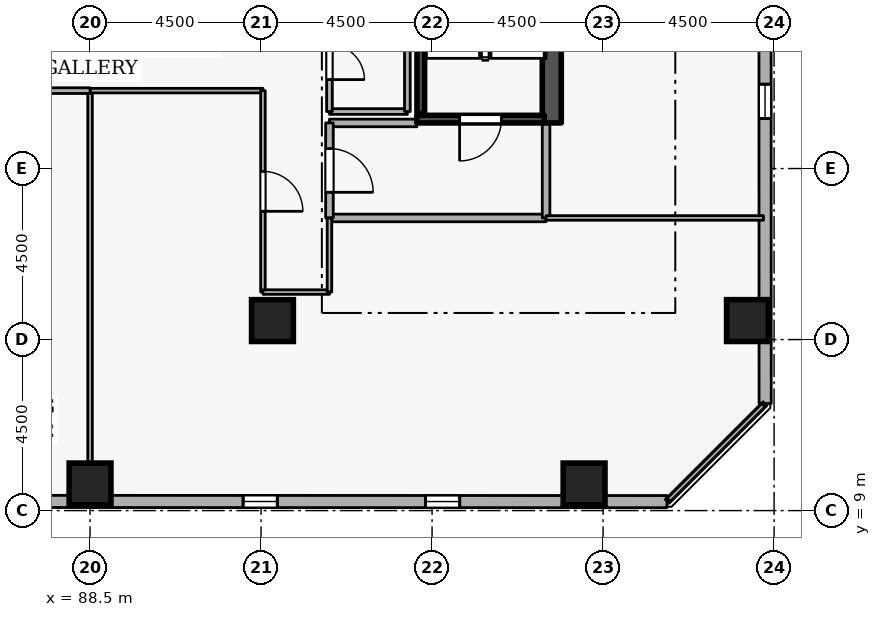
"""IFC4 building model, lengths in metres.
Left out: names, types, materials, properties, quantities, classifications, styles, units other than length and angle.
Written with IfcOpenShell. Run it as: python <this file> out.ifc"""

import sys

from ifc_helpers import new_model, si_unit, direction, frame, frame_2d, origin, origin_2d, place, context, subcontext, project, spatial, rectangle, extrude, element, fill, save


model = new_model("IFC4")
c1 = context("Model", 3, precision=1e-05, world=origin(), true_north=direction((0.0, 1.0)))
c2 = subcontext(c1, "Body", "Model", "MODEL_VIEW")
j1 = project(units=[si_unit("LENGTHUNIT", "METRE"), si_unit("PLANEANGLEUNIT", "RADIAN")], contexts=[c1])
p1 = place(None, origin())
s1 = spatial("IfcSite", under=j1, at=p1, CompositionType="ELEMENT")
p2 = place(p1, origin())
s2 = spatial("IfcBuilding", under=s1, at=p2, CompositionType="ELEMENT")
p3 = place(p2, frame((0.0, 0.0, 178.5)))
s3 = spatial("IfcBuildingStorey", under=s2, at=p3, CompositionType="ELEMENT", Elevation=178.5)
p4 = place(p3, frame((100.65, 19.2, 0.0), z_axis=(0.0, 0.0, 1.0), x_axis=(0.0, 1.0, 0.0)))
e1 = element("IfcWall", 1, at=p4, inside=s3, PredefinedType="SHEAR", context=c2, shape_type="SweptSolid", body=[
    extrude(rectangle(XDim=15.6, YDim=0.5, at=frame_2d((7.8, 0.0))), origin(), (0.0, 0.0, 1.0), 3.6),
])
for number, where, z_axis, x_axis in (
    (2, (105.8, 14.0, 0.0), (0.0, 0.0, 1.0), (1.0, 0.0, 0.0)),
    (3, (101.5, 9.7, 0.0), (0.0, 0.0, 1.0), (1.0, 0.0, 0.0)),
    (4, (88.5, 9.7, 0.0), (0.0, 0.0, 1.0), (1.0, 0.0, 0.0)),
    (5, (93.3, 14.0, 0.0), (0.0, 0.0, 1.0), (1.0, 0.0, 0.0)),
):
    element("IfcColumn", number, at=place(p3, frame(where, z_axis=z_axis, x_axis=x_axis)), inside=s3, PredefinedType="COLUMN", context=c2, shape_type="SweptSolid", body=[
        extrude(rectangle(XDim=1.1, YDim=1.1, at=origin_2d()), origin(), (0.0, 0.0, 1.0), 3.6),
    ])
p5 = place(p3, frame((70.628, 9.246, 0.0), z_axis=(0.0, 0.0, 1.0), x_axis=(0.999999944762, -0.000332378036, 0.0)))
e6 = element("IfcWall", 6, at=p5, inside=s3, PredefinedType="STANDARD", context=c2, shape_type="SweptSolid", body=[
    extrude(rectangle(XDim=33.054, YDim=0.32, at=frame_2d((16.527, 0.0))), origin(), (0.0, 0.0, 1.0), 2.7),
])
p6 = place(p5, frame((2.7, 0.0, 0.72)))
e7 = element("IfcOpeningElement", 7, at=p6, cuts=e6, PredefinedType="OPENING", context=c2, shape_type="SweptSolid", body=[
    extrude(rectangle(XDim=0.9, YDim=1.75, at=frame_2d((0.45, 0.875))), frame((0.0, 0.17, 0.0), z_axis=(0.0, -1.0, 0.0), x_axis=(1.0, 0.0, 0.0)), (0.0, 0.0, 1.0), 0.34),
])
p7 = place(p5, frame((7.5, 0.0, 0.72)))
e8 = element("IfcOpeningElement", 8, at=p7, cuts=e6, PredefinedType="OPENING", context=c2, shape_type="SweptSolid", body=[
    extrude(rectangle(XDim=0.9, YDim=1.75, at=frame_2d((0.45, 0.875))), frame((0.0, 0.17, 0.0), z_axis=(0.0, -1.0, 0.0), x_axis=(1.0, 0.0, 0.0)), (0.0, 0.0, 1.0), 0.34),
])
p8 = place(p5, frame((12.3, 0.0, 0.72)))
e9 = element("IfcOpeningElement", 9, at=p8, cuts=e6, PredefinedType="OPENING", context=c2, shape_type="SweptSolid", body=[
    extrude(rectangle(XDim=0.9, YDim=1.75, at=frame_2d((0.45, 0.875))), frame((0.0, 0.17, 0.0), z_axis=(0.0, -1.0, 0.0), x_axis=(1.0, 0.0, 0.0)), (0.0, 0.0, 1.0), 0.34),
])
p9 = place(p5, frame((21.9, 0.0, 0.72)))
e10 = element("IfcOpeningElement", 10, at=p9, cuts=e6, PredefinedType="OPENING", context=c2, shape_type="SweptSolid", body=[
    extrude(rectangle(XDim=0.9, YDim=1.75, at=frame_2d((0.45, 0.875))), frame((0.0, 0.17, 0.0), z_axis=(0.0, -1.0, 0.0), x_axis=(1.0, 0.0, 0.0)), (0.0, 0.0, 1.0), 0.34),
])
p10 = place(p5, frame((26.7, 0.0, 0.72)))
e11 = element("IfcOpeningElement", 11, at=p10, cuts=e6, PredefinedType="OPENING", context=c2, shape_type="SweptSolid", body=[
    extrude(rectangle(XDim=0.9, YDim=1.75, at=frame_2d((0.45, 0.875))), frame((0.0, 0.17, 0.0), z_axis=(0.0, -1.0, 0.0), x_axis=(1.0, 0.0, 0.0)), (0.0, 0.0, 1.0), 0.34),
])
p11 = place(p3, frame((106.265, 11.819, 0.0), z_axis=(0.0, 0.0, 1.0), x_axis=(-0.000332378036, 0.999999944762, 0.0)))
e12 = element("IfcWall", 12, at=p11, inside=s3, PredefinedType="STANDARD", context=c2, shape_type="SweptSolid", body=[
    extrude(rectangle(XDim=33.054, YDim=0.32, at=frame_2d((16.527, 0.0))), origin(), (0.0, 0.0, 1.0), 2.7),
])
p12 = place(p11, frame((7.5, 0.0, 0.72)))
e13 = element("IfcOpeningElement", 13, at=p12, cuts=e12, PredefinedType="OPENING", context=c2, shape_type="SweptSolid", body=[
    extrude(rectangle(XDim=0.9, YDim=1.75, at=frame_2d((0.45, 0.875))), frame((0.0, 0.17, 0.0), z_axis=(0.0, -1.0, 0.0), x_axis=(1.0, 0.0, 0.0)), (0.0, 0.0, 1.0), 0.34),
])
p13 = place(p11, frame((12.3, 0.0, 0.72)))
e14 = element("IfcOpeningElement", 14, at=p13, cuts=e12, PredefinedType="OPENING", context=c2, shape_type="SweptSolid", body=[
    extrude(rectangle(XDim=0.9, YDim=1.75, at=frame_2d((0.45, 0.875))), frame((0.0, 0.17, 0.0), z_axis=(0.0, -1.0, 0.0), x_axis=(1.0, 0.0, 0.0)), (0.0, 0.0, 1.0), 0.34),
])
p14 = place(p11, frame((17.1, 0.0, 0.72)))
e15 = element("IfcOpeningElement", 15, at=p14, cuts=e12, PredefinedType="OPENING", context=c2, shape_type="SweptSolid", body=[
    extrude(rectangle(XDim=0.9, YDim=1.75, at=frame_2d((0.45, 0.875))), frame((0.0, 0.17, 0.0), z_axis=(0.0, -1.0, 0.0), x_axis=(1.0, 0.0, 0.0)), (0.0, 0.0, 1.0), 0.34),
])
p15 = place(p11, frame((21.9, 0.0, 0.72)))
e16 = element("IfcOpeningElement", 16, at=p15, cuts=e12, PredefinedType="OPENING", context=c2, shape_type="SweptSolid", body=[
    extrude(rectangle(XDim=0.9, YDim=1.75, at=frame_2d((0.45, 0.875))), frame((0.0, 0.17, 0.0), z_axis=(0.0, -1.0, 0.0), x_axis=(1.0, 0.0, 0.0)), (0.0, 0.0, 1.0), 0.34),
])
p16 = place(p3, frame((100.45, 19.3, 0.0), z_axis=(0.0, 0.0, 1.0), x_axis=(-1.0, 0.0, 0.0)))
e17 = element("IfcWall", 17, at=p16, inside=s3, PredefinedType="SHEAR", context=c2, shape_type="SweptSolid", body=[
    extrude(rectangle(XDim=3.35, YDim=0.2, at=frame_2d((1.675, 0.0))), origin(), (0.0, 0.0, 1.0), 3.6),
])
p17 = place(p16, frame((1.125, 0.0, 0.0)))
e18 = element("IfcOpeningElement", 18, at=p17, cuts=e17, PredefinedType="OPENING", context=c2, shape_type="SweptSolid", body=[
    extrude(rectangle(XDim=1.1, YDim=2.1, at=frame_2d((0.55, 1.05))), frame((0.0, 0.11, 0.0), z_axis=(0.0, -1.0, 0.0), x_axis=(1.0, 0.0, 0.0)), (0.0, 0.0, 1.0), 0.22),
])
p18 = place(p3, frame((97.203, 26.55, 0.0), z_axis=(0.0, 0.0, 1.0), x_axis=(0.0, -1.0, 0.0)))
e19 = element("IfcWall", 19, at=p18, inside=s3, PredefinedType="SHEAR", context=c2, shape_type="SweptSolid", body=[
    extrude(rectangle(XDim=7.1, YDim=0.2, at=frame_2d((3.55, 0.0))), origin(), (0.0, 0.0, 1.0), 3.6),
])
p19 = place(p3, frame((94.8, 16.7, 0.0), z_axis=(0.0, 0.0, 1.0), x_axis=(1.0, 0.0, 0.0)))
e20 = element("IfcWall", 20, at=p19, inside=s3, PredefinedType="STANDARD", context=c2, shape_type="SweptSolid", body=[
    extrude(rectangle(XDim=5.7, YDim=0.2, at=frame_2d((2.85, 0.0))), origin(), (0.0, 0.0, 1.0), 3.34),
])
p20 = place(p3, frame((100.5, 16.7, 0.0), z_axis=(0.0, 0.0, 1.0), x_axis=(0.0, 1.0, 0.0)))
e21 = element("IfcWall", 21, at=p20, inside=s3, PredefinedType="STANDARD", context=c2, shape_type="SweptSolid", body=[
    extrude(rectangle(XDim=2.5, YDim=0.2, at=frame_2d((1.25, 0.0))), origin(), (0.0, 0.0, 1.0), 3.34),
])
p21 = place(p3, frame((97.1, 19.2, 0.0), z_axis=(0.0, 0.0, 1.0), x_axis=(-1.0, 0.0, 0.0)))
e22 = element("IfcWall", 22, at=p21, inside=s3, PredefinedType="STANDARD", context=c2, shape_type="SweptSolid", body=[
    extrude(rectangle(XDim=2.3, YDim=0.2, at=frame_2d((1.15, 0.0))), origin(), (0.0, 0.0, 1.0), 2.545),
])
p22 = place(p3, frame((94.8, 19.2, 0.0), z_axis=(0.0, 0.0, 1.0), x_axis=(0.0, -1.0, 0.0)))
e23 = element("IfcWall", 23, at=p22, inside=s3, PredefinedType="STANDARD", context=c2, shape_type="SweptSolid", body=[
    extrude(rectangle(XDim=2.5, YDim=0.2, at=frame_2d((1.25, 0.0))), origin(), (0.0, 0.0, 1.0), 3.34),
])
p23 = place(p22, frame((0.675, 0.0, 0.0)))
e24 = element("IfcOpeningElement", 24, at=p23, cuts=e23, PredefinedType="OPENING", context=c2, shape_type="SweptSolid", body=[
    extrude(rectangle(XDim=1.15, YDim=2.1, at=frame_2d((0.575, 1.05))), frame((0.0, 0.11, 0.0), z_axis=(0.0, -1.0, 0.0), x_axis=(1.0, 0.0, 0.0)), (0.0, 0.0, 1.0), 0.22),
])
p24 = place(p3, frame((94.8, 19.5, 0.0), z_axis=(0.0, 0.0, 1.0), x_axis=(1.0, 0.0, 0.0)))
e25 = element("IfcWall", 25, at=p24, inside=s3, PredefinedType="PARTITIONING", context=c2, shape_type="SweptSolid", body=[
    extrude(rectangle(XDim=2.05, YDim=0.15, at=frame_2d((1.025, 0.0))), origin(), (0.0, 0.0, 1.0), 2.545),
])
p25 = place(p3, frame((96.85, 19.5, 0.0), z_axis=(0.0, 0.0, 1.0), x_axis=(0.0, 1.0, 0.0)))
e26 = element("IfcWall", 26, at=p25, inside=s3, PredefinedType="PARTITIONING", context=c2, shape_type="SweptSolid", body=[
    extrude(rectangle(XDim=2.6, YDim=0.15, at=frame_2d((1.3, 0.0))), origin(), (0.0, 0.0, 1.0), 3.34),
])
p26 = place(p3, frame((94.8, 22.1, 0.0), z_axis=(0.0, 0.0, 1.0), x_axis=(0.0, -1.0, 0.0)))
e27 = element("IfcWall", 27, at=p26, inside=s3, PredefinedType="PARTITIONING", context=c2, shape_type="SweptSolid", body=[
    extrude(rectangle(XDim=2.6, YDim=0.15, at=frame_2d((1.3, 0.0))), origin(), (0.0, 0.0, 1.0), 3.34),
])
p27 = place(p26, frame((0.84, 0.0, 0.0)))
e28 = element("IfcOpeningElement", 28, at=p27, cuts=e27, PredefinedType="OPENING", context=c2, shape_type="SweptSolid", body=[
    extrude(rectangle(XDim=0.92, YDim=2.08, at=frame_2d((0.46, 1.04))), frame((0.0, 0.085, 0.0), z_axis=(0.0, -1.0, 0.0), x_axis=(1.0, 0.0, 0.0)), (0.0, 0.0, 1.0), 0.17),
])
p28 = place(p3, frame((88.5, 9.28, 0.0), z_axis=(0.0, 0.0, 1.0), x_axis=(0.0, 1.0, 0.0)))
e29 = element("IfcWall", 29, at=p28, inside=s3, PredefinedType="PARTITIONING", context=c2, shape_type="SweptSolid", body=[
    extrude(rectangle(XDim=10.77, YDim=0.12, at=frame_2d((5.385, 0.0))), origin(), (0.0, 0.0, 1.0), 2.932),
])
p29 = place(p3, frame((88.5, 20.05, 0.0), z_axis=(0.0, 0.0, 1.0), x_axis=(1.0, 0.0, 0.0)))
e30 = element("IfcWall", 30, at=p29, inside=s3, PredefinedType="PARTITIONING", context=c2, shape_type="SweptSolid", body=[
    extrude(rectangle(XDim=4.55, YDim=0.12, at=frame_2d((2.275, 0.0))), origin(), (0.0, 0.0, 1.0), 3.34),
])
p30 = place(p3, frame((93.05, 20.05, 0.0), z_axis=(0.0, 0.0, 1.0), x_axis=(0.0, -1.0, 0.0)))
e31 = element("IfcWall", 31, at=p30, inside=s3, PredefinedType="PARTITIONING", context=c2, shape_type="SweptSolid", body=[
    extrude(rectangle(XDim=5.3, YDim=0.12, at=frame_2d((2.65, 0.0))), origin(), (0.0, 0.0, 1.0), 3.34),
])
p31 = place(p30, frame((2.125, 0.0, 0.0)))
e32 = element("IfcOpeningElement", 32, at=p31, cuts=e31, PredefinedType="OPENING", context=c2, shape_type="SweptSolid", body=[
    extrude(rectangle(XDim=1.05, YDim=2.1, at=frame_2d((0.525, 1.05))), frame((0.0, 0.07, 0.0), z_axis=(0.0, -1.0, 0.0), x_axis=(1.0, 0.0, 0.0)), (0.0, 0.0, 1.0), 0.14),
])
p32 = place(p3, frame((93.05, 14.75, 0.0), z_axis=(0.0, 0.0, 1.0), x_axis=(1.0, 0.0, 0.0)))
e33 = element("IfcWall", 33, at=p32, inside=s3, PredefinedType="PARTITIONING", context=c2, shape_type="SweptSolid", body=[
    extrude(rectangle(XDim=1.75, YDim=0.12, at=frame_2d((0.875, 0.0))), origin(), (0.0, 0.0, 1.0), 3.34),
])
p33 = place(p3, frame((94.8, 14.75, 0.0), z_axis=(0.0, 0.0, 1.0), x_axis=(0.0, 1.0, 0.0)))
e34 = element("IfcWall", 34, at=p33, inside=s3, PredefinedType="PARTITIONING", context=c2, shape_type="SweptSolid", body=[
    extrude(rectangle(XDim=1.95, YDim=0.12, at=frame_2d((0.975, 0.0))), origin(), (0.0, 0.0, 1.0), 3.34),
])
p34 = place(p3, frame((100.5, 16.7, 0.0), z_axis=(0.0, 0.0, 1.0), x_axis=(1.0, 0.0, 0.0)))
e35 = element("IfcWall", 35, at=p34, inside=s3, PredefinedType="PARTITIONING", context=c2, shape_type="SweptSolid", body=[
    extrude(rectangle(XDim=5.72, YDim=0.12, at=frame_2d((2.86, 0.0))), origin(), (0.0, 0.0, 1.0), 3.34),
])
p35 = place(p3, frame((106.22, 11.775, 0.0), z_axis=(0.0, 0.0, 1.0), x_axis=(-0.707106781187, -0.707106781187, 0.0)))
e36 = element("IfcWall", 36, at=p35, inside=s3, PredefinedType="PARTITIONING", context=c2, shape_type="SweptSolid", body=[
    extrude(rectangle(XDim=3.528, YDim=0.12, at=frame_2d((1.764, 0.0))), origin(), (0.0, 0.0, 1.0), 3.34),
])
p36 = place(p3, frame((83.95, 20.05, 0.0), z_axis=(0.0, 0.0, 1.0), x_axis=(1.0, 0.0, 0.0)))
e37 = element("IfcWall", 37, at=p36, inside=s3, PredefinedType="PARTITIONING", context=c2, shape_type="SweptSolid", body=[
    extrude(rectangle(XDim=4.55, YDim=0.15, at=frame_2d((2.275, 0.0))), origin(), (0.0, 0.0, 1.0), 3.34),
])
p37 = place(p9, origin())
e38 = element("IfcWindow", 38, at=p37, inside=s3, PartitioningType="SINGLE_PANEL", PredefinedType="WINDOW", context=c2, shape_type="SweptSolid", body=[
    extrude(rectangle(XDim=0.9, YDim=1.75, at=frame_2d((0.45, 0.875))), frame((0.0, 0.03, 0.0), z_axis=(0.0, -1.0, 0.0), x_axis=(1.0, 0.0, 0.0)), (0.0, 0.0, 1.0), 0.06),
])
fill(e10, e38)
p38 = place(p10, origin())
e39 = element("IfcWindow", 39, at=p38, inside=s3, PartitioningType="SINGLE_PANEL", PredefinedType="WINDOW", context=c2, shape_type="SweptSolid", body=[
    extrude(rectangle(XDim=0.9, YDim=1.75, at=frame_2d((0.45, 0.875))), frame((0.0, 0.03, 0.0), z_axis=(0.0, -1.0, 0.0), x_axis=(1.0, 0.0, 0.0)), (0.0, 0.0, 1.0), 0.06),
])
fill(e11, e39)
p39 = place(p12, origin())
e40 = element("IfcWindow", 40, at=p39, inside=s3, PartitioningType="SINGLE_PANEL", PredefinedType="WINDOW", context=c2, shape_type="SweptSolid", body=[
    extrude(rectangle(XDim=0.9, YDim=1.75, at=frame_2d((0.45, 0.875))), frame((0.0, 0.03, 0.0), z_axis=(0.0, -1.0, 0.0), x_axis=(1.0, 0.0, 0.0)), (0.0, 0.0, 1.0), 0.06),
])
fill(e13, e40)
p40 = place(p17, origin())
e41 = element("IfcDoor", 41, at=p40, inside=s3, OperationType="SINGLE_SWING_RIGHT", PredefinedType="DOOR", context=c2, shape_type="SweptSolid", body=[
    extrude(rectangle(XDim=1.1, YDim=2.1, at=frame_2d((0.55, 1.05))), frame((0.0, 0.025, 0.0), z_axis=(0.0, -1.0, 0.0), x_axis=(1.0, 0.0, 0.0)), (0.0, 0.0, 1.0), 0.05),
])
fill(e18, e41)
p41 = place(p23, origin())
e42 = element("IfcDoor", 42, at=p41, inside=s3, OperationType="SINGLE_SWING_RIGHT", PredefinedType="DOOR", context=c2, shape_type="SweptSolid", body=[
    extrude(rectangle(XDim=1.15, YDim=2.1, at=frame_2d((0.575, 1.05))), frame((0.0, 0.025, 0.0), z_axis=(0.0, -1.0, 0.0), x_axis=(1.0, 0.0, 0.0)), (0.0, 0.0, 1.0), 0.05),
])
fill(e24, e42)
p42 = place(p27, origin())
e43 = element("IfcDoor", 43, at=p42, inside=s3, OperationType="SINGLE_SWING_RIGHT", PredefinedType="DOOR", context=c2, shape_type="SweptSolid", body=[
    extrude(rectangle(XDim=0.92, YDim=2.08, at=frame_2d((0.46, 1.04))), frame((0.0, 0.025, 0.0), z_axis=(0.0, -1.0, 0.0), x_axis=(1.0, 0.0, 0.0)), (0.0, 0.0, 1.0), 0.05),
])
fill(e28, e43)
p43 = place(p31, origin())
e44 = element("IfcDoor", 44, at=p43, inside=s3, OperationType="SINGLE_SWING_RIGHT", PredefinedType="DOOR", context=c2, shape_type="SweptSolid", body=[
    extrude(rectangle(XDim=1.05, YDim=2.1, at=frame_2d((0.525, 1.05))), frame((0.0, 0.025, 0.0), z_axis=(0.0, -1.0, 0.0), x_axis=(1.0, 0.0, 0.0)), (0.0, 0.0, 1.0), 0.05),
])
fill(e32, e44)
save(model, sys.argv[1])
